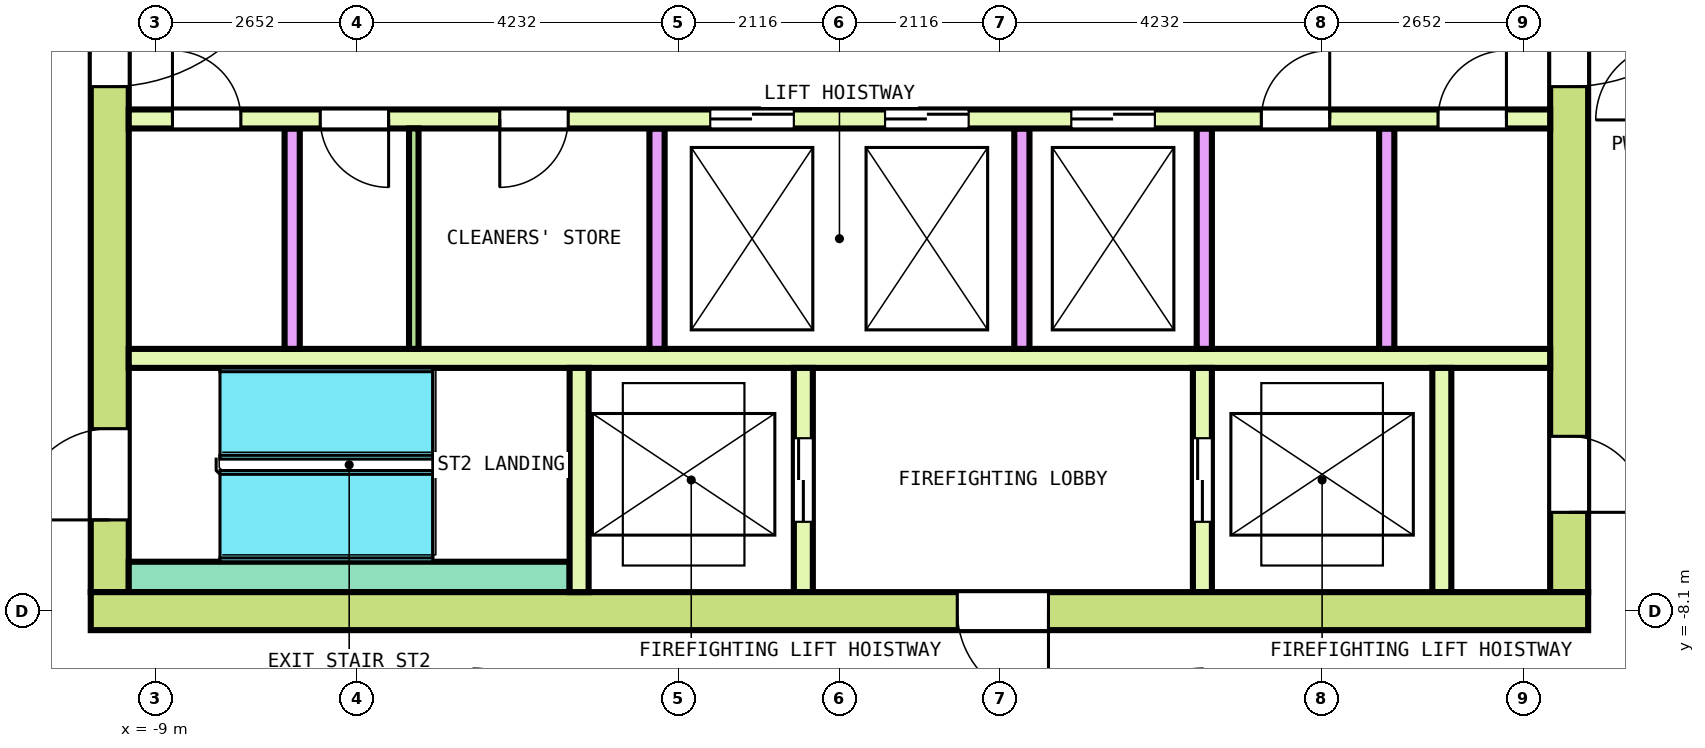
"""IFC4 building model, lengths in metres.
Left out: names, types, materials, properties, quantities, classifications, styles, units other than length and angle.
Written with IfcOpenShell. Run it as: python <this file> out.ifc"""

import sys

from ifc_helpers import new_model, si_unit, direction, frame, frame_2d, origin, place, context, subcontext, project, spatial, rectangle, extrude, element, fill, save


model = new_model("IFC4")
c1 = context("Model", 3, precision=1e-05, world=origin(), true_north=direction((0.0, 1.0)))
c2 = subcontext(c1, "Body", "Model", "MODEL_VIEW")
j1 = project(units=[si_unit("LENGTHUNIT", "METRE"), si_unit("PLANEANGLEUNIT", "RADIAN")], contexts=[c1])
p1 = place(None, origin())
s1 = spatial("IfcSite", under=j1, at=p1, CompositionType="ELEMENT")
p2 = place(p1, origin())
s2 = spatial("IfcBuilding", under=s1, at=p2, CompositionType="ELEMENT")
p3 = place(p2, frame((0.0, 0.0, 271.0)))
s3 = spatial("IfcBuildingStorey", under=s2, at=p3, CompositionType="ELEMENT", Elevation=271.0)
p4 = place(p3, frame((-9.85, -8.1, 0.0), z_axis=(0.0, 0.0, 1.0), x_axis=(1.0, 0.0, 0.0)))
e1 = element("IfcWall", 1, at=p4, inside=s3, PredefinedType="SHEAR", context=c2, shape_type="SweptSolid", body=[
    extrude(rectangle(XDim=19.7, YDim=0.5, at=frame_2d((9.85, 0.0))), origin(), (0.0, 0.0, 1.0), 3.7),
])
p5 = place(p4, frame((11.4, 0.0, 0.0)))
e2 = element("IfcOpeningElement", 2, at=p5, cuts=e1, PredefinedType="OPENING", context=c2, shape_type="SweptSolid", body=[
    extrude(rectangle(XDim=1.2, YDim=2.1, at=frame_2d((0.6, 1.05))), frame((0.0, 0.26, 0.0), z_axis=(0.0, -1.0, 0.0), x_axis=(1.0, 0.0, 0.0)), (0.0, 0.0, 1.0), 0.52),
])
p6 = place(p3, frame((-9.6, -7.85, 0.0), z_axis=(0.0, 0.0, 1.0), x_axis=(0.0, 1.0, 0.0)))
e3 = element("IfcWall", 3, at=p6, inside=s3, PredefinedType="SHEAR", context=c2, shape_type="SweptSolid", body=[
    extrude(rectangle(XDim=15.7, YDim=0.5, at=frame_2d((7.85, 0.0))), origin(), (0.0, 0.0, 1.0), 3.7),
])
p7 = place(p6, frame((6.65, 0.0, 0.0)))
e4 = element("IfcOpeningElement", 4, at=p7, cuts=e3, PredefinedType="OPENING", context=c2, shape_type="SweptSolid", body=[
    extrude(rectangle(XDim=2.4, YDim=2.1, at=frame_2d((1.2, 1.05))), frame((0.0, 0.26, 0.0), z_axis=(0.0, -1.0, 0.0), x_axis=(1.0, 0.0, 0.0)), (0.0, 0.0, 1.0), 0.52),
])
p8 = place(p6, frame((13.55, 0.0, 0.0)))
e5 = element("IfcOpeningElement", 5, at=p8, cuts=e3, PredefinedType="OPENING", context=c2, shape_type="SweptSolid", body=[
    extrude(rectangle(XDim=1.2, YDim=2.1, at=frame_2d((0.6, 1.05))), frame((0.0, 0.26, 0.0), z_axis=(0.0, -1.0, 0.0), x_axis=(1.0, 0.0, 0.0)), (0.0, 0.0, 1.0), 0.52),
])
p9 = place(p6, frame((0.95, 0.0, 0.0)))
e6 = element("IfcOpeningElement", 6, at=p9, cuts=e3, PredefinedType="OPENING", context=c2, shape_type="SweptSolid", body=[
    extrude(rectangle(XDim=1.2, YDim=2.1, at=frame_2d((0.6, 1.05))), frame((0.0, 0.26, 0.0), z_axis=(0.0, -1.0, 0.0), x_axis=(1.0, 0.0, 0.0)), (0.0, 0.0, 1.0), 0.52),
])
p10 = place(p3, frame((9.6, -7.85, 0.0), z_axis=(0.0, 0.0, 1.0), x_axis=(0.0, 1.0, 0.0)))
e7 = element("IfcWall", 7, at=p10, inside=s3, PredefinedType="SHEAR", context=c2, shape_type="SweptSolid", body=[
    extrude(rectangle(XDim=15.7, YDim=0.5, at=frame_2d((7.85, 0.0))), origin(), (0.0, 0.0, 1.0), 3.7),
])
p11 = place(p10, frame((6.65, 0.0, 0.0)))
e8 = element("IfcOpeningElement", 8, at=p11, cuts=e7, PredefinedType="OPENING", context=c2, shape_type="SweptSolid", body=[
    extrude(rectangle(XDim=2.4, YDim=2.1, at=frame_2d((1.2, 1.05))), frame((0.0, 0.26, 0.0), z_axis=(0.0, -1.0, 0.0), x_axis=(1.0, 0.0, 0.0)), (0.0, 0.0, 1.0), 0.52),
])
p12 = place(p10, frame((13.55, 0.0, 0.0)))
e9 = element("IfcOpeningElement", 9, at=p12, cuts=e7, PredefinedType="OPENING", context=c2, shape_type="SweptSolid", body=[
    extrude(rectangle(XDim=1.2, YDim=2.1, at=frame_2d((0.6, 1.05))), frame((0.0, 0.26, 0.0), z_axis=(0.0, -1.0, 0.0), x_axis=(1.0, 0.0, 0.0)), (0.0, 0.0, 1.0), 0.52),
])
p13 = place(p10, frame((1.05, 0.0, 0.0)))
e10 = element("IfcOpeningElement", 10, at=p13, cuts=e7, PredefinedType="OPENING", context=c2, shape_type="SweptSolid", body=[
    extrude(rectangle(XDim=1.0, YDim=2.1, at=frame_2d((0.5, 1.05))), frame((0.0, 0.26, 0.0), z_axis=(0.0, -1.0, 0.0), x_axis=(1.0, 0.0, 0.0)), (0.0, 0.0, 1.0), 0.52),
])
p14 = place(p3, frame((-9.35, -1.625, 0.0), z_axis=(0.0, 0.0, 1.0), x_axis=(1.0, 0.0, 0.0)))
e11 = element("IfcWall", 11, at=p14, inside=s3, PredefinedType="SOLIDWALL", context=c2, shape_type="SweptSolid", body=[
    extrude(rectangle(XDim=18.7, YDim=0.25, at=frame_2d((9.35, 0.0))), origin(), (0.0, 0.0, 1.0), 3.7),
])
p15 = place(p14, frame((7.65, 0.0, 0.0)))
e12 = element("IfcOpeningElement", 12, at=p15, cuts=e11, PredefinedType="OPENING", context=c2, shape_type="SweptSolid", body=[
    extrude(rectangle(XDim=1.1, YDim=2.1, at=frame_2d((0.55, 1.05))), frame((0.0, 0.135, 0.0), z_axis=(0.0, -1.0, 0.0), x_axis=(1.0, 0.0, 0.0)), (0.0, 0.0, 1.0), 0.27),
])
p16 = place(p14, frame((9.95, 0.0, 0.0)))
e13 = element("IfcOpeningElement", 13, at=p16, cuts=e11, PredefinedType="OPENING", context=c2, shape_type="SweptSolid", body=[
    extrude(rectangle(XDim=1.1, YDim=2.1, at=frame_2d((0.55, 1.05))), frame((0.0, 0.135, 0.0), z_axis=(0.0, -1.0, 0.0), x_axis=(1.0, 0.0, 0.0)), (0.0, 0.0, 1.0), 0.27),
])
p17 = place(p14, frame((12.4, 0.0, 0.0)))
e14 = element("IfcOpeningElement", 14, at=p17, cuts=e11, PredefinedType="OPENING", context=c2, shape_type="SweptSolid", body=[
    extrude(rectangle(XDim=1.1, YDim=2.1, at=frame_2d((0.55, 1.05))), frame((0.0, 0.135, 0.0), z_axis=(0.0, -1.0, 0.0), x_axis=(1.0, 0.0, 0.0)), (0.0, 0.0, 1.0), 0.27),
])
p18 = place(p14, frame((0.575, 0.0, 0.0)))
e15 = element("IfcOpeningElement", 15, at=p18, cuts=e11, PredefinedType="OPENING", context=c2, shape_type="SweptSolid", body=[
    extrude(rectangle(XDim=0.9, YDim=2.1, at=frame_2d((0.45, 1.05))), frame((0.0, 0.135, 0.0), z_axis=(0.0, -1.0, 0.0), x_axis=(1.0, 0.0, 0.0)), (0.0, 0.0, 1.0), 0.27),
])
p19 = place(p14, frame((2.519, 0.0, 0.0)))
e16 = element("IfcOpeningElement", 16, at=p19, cuts=e11, PredefinedType="OPENING", context=c2, shape_type="SweptSolid", body=[
    extrude(rectangle(XDim=0.9, YDim=2.1, at=frame_2d((0.45, 1.05))), frame((0.0, 0.135, 0.0), z_axis=(0.0, -1.0, 0.0), x_axis=(1.0, 0.0, 0.0)), (0.0, 0.0, 1.0), 0.27),
])
p20 = place(p14, frame((4.881, 0.0, 0.0)))
e17 = element("IfcOpeningElement", 17, at=p20, cuts=e11, PredefinedType="OPENING", context=c2, shape_type="SweptSolid", body=[
    extrude(rectangle(XDim=0.9, YDim=2.1, at=frame_2d((0.45, 1.05))), frame((0.0, 0.135, 0.0), z_axis=(0.0, -1.0, 0.0), x_axis=(1.0, 0.0, 0.0)), (0.0, 0.0, 1.0), 0.27),
])
p21 = place(p14, frame((14.9, 0.0, 0.0)))
e18 = element("IfcOpeningElement", 18, at=p21, cuts=e11, PredefinedType="OPENING", context=c2, shape_type="SweptSolid", body=[
    extrude(rectangle(XDim=0.9, YDim=2.1, at=frame_2d((0.45, 1.05))), frame((0.0, 0.135, 0.0), z_axis=(0.0, -1.0, 0.0), x_axis=(1.0, 0.0, 0.0)), (0.0, 0.0, 1.0), 0.27),
])
p22 = place(p14, frame((17.225, 0.0, 0.0)))
e19 = element("IfcOpeningElement", 19, at=p22, cuts=e11, PredefinedType="OPENING", context=c2, shape_type="SweptSolid", body=[
    extrude(rectangle(XDim=0.9, YDim=2.1, at=frame_2d((0.45, 1.05))), frame((0.0, 0.135, 0.0), z_axis=(0.0, -1.0, 0.0), x_axis=(1.0, 0.0, 0.0)), (0.0, 0.0, 1.0), 0.27),
])
p23 = place(p3, frame((-9.35, -4.775, 0.0), z_axis=(0.0, 0.0, 1.0), x_axis=(1.0, 0.0, 0.0)))
e20 = element("IfcWall", 20, at=p23, inside=s3, PredefinedType="SOLIDWALL", context=c2, shape_type="SweptSolid", body=[
    extrude(rectangle(XDim=18.7, YDim=0.25, at=frame_2d((9.35, 0.0))), origin(), (0.0, 0.0, 1.0), 3.7),
])
for number, where, z_axis, x_axis in (
    (21, (-7.2, -4.65, 0.0), (0.0, 0.0, 1.0), (0.0, 1.0, 0.0)),
    (22, (-2.4, -4.65, 0.0), (0.0, 0.0, 1.0), (0.0, 1.0, 0.0)),
    (23, (2.4, -4.65, 0.0), (0.0, 0.0, 1.0), (0.0, 1.0, 0.0)),
    (24, (4.8, -4.65, 0.0), (0.0, 0.0, 1.0), (0.0, 1.0, 0.0)),
    (25, (7.2, -4.65, 0.0), (0.0, 0.0, 1.0), (0.0, 1.0, 0.0)),
):
    element("IfcWall", number, at=place(p3, frame(where, z_axis=z_axis, x_axis=x_axis)), inside=s3, PredefinedType="SOLIDWALL", context=c2, shape_type="SweptSolid", body=[
        extrude(rectangle(XDim=2.9, YDim=0.2, at=frame_2d((1.45, 0.0))), origin(), (0.0, 0.0, 1.0), 3.7),
    ])
p24 = place(p3, frame((-9.35, -7.65, 0.0), z_axis=(0.0, 0.0, 1.0), x_axis=(1.0, 0.0, 0.0)))
e26 = element("IfcWall", 26, at=p24, inside=s3, PredefinedType="SOLIDWALL", context=c2, shape_type="SweptSolid", body=[
    extrude(rectangle(XDim=5.8, YDim=0.4, at=frame_2d((2.9, 0.0))), origin(), (0.0, 0.0, 1.0), 3.7),
])
p25 = place(p3, frame((-3.425, -7.85, 0.0), z_axis=(0.0, 0.0, 1.0), x_axis=(0.0, 1.0, 0.0)))
e27 = element("IfcWall", 27, at=p25, inside=s3, PredefinedType="SOLIDWALL", context=c2, shape_type="SweptSolid", body=[
    extrude(rectangle(XDim=2.95, YDim=0.25, at=frame_2d((1.475, 0.0))), origin(), (0.0, 0.0, 1.0), 3.7),
])
p26 = place(p3, frame((-0.475, -7.85, 0.0), z_axis=(0.0, 0.0, 1.0), x_axis=(0.0, 1.0, 0.0)))
e28 = element("IfcWall", 28, at=p26, inside=s3, PredefinedType="SOLIDWALL", context=c2, shape_type="SweptSolid", body=[
    extrude(rectangle(XDim=2.95, YDim=0.25, at=frame_2d((1.475, 0.0))), origin(), (0.0, 0.0, 1.0), 3.7),
])
p27 = place(p26, frame((0.925, 0.0, 0.0)))
e29 = element("IfcOpeningElement", 29, at=p27, cuts=e28, PredefinedType="OPENING", context=c2, shape_type="SweptSolid", body=[
    extrude(rectangle(XDim=1.1, YDim=2.1, at=frame_2d((0.55, 1.05))), frame((0.0, 0.135, 0.0), z_axis=(0.0, -1.0, 0.0), x_axis=(1.0, 0.0, 0.0)), (0.0, 0.0, 1.0), 0.27),
])
p28 = place(p3, frame((4.775, -7.85, 0.0), z_axis=(0.0, 0.0, 1.0), x_axis=(0.0, 1.0, 0.0)))
e30 = element("IfcWall", 30, at=p28, inside=s3, PredefinedType="SOLIDWALL", context=c2, shape_type="SweptSolid", body=[
    extrude(rectangle(XDim=2.95, YDim=0.25, at=frame_2d((1.475, 0.0))), origin(), (0.0, 0.0, 1.0), 3.7),
])
p29 = place(p28, frame((0.925, 0.0, 0.0)))
e31 = element("IfcOpeningElement", 31, at=p29, cuts=e30, PredefinedType="OPENING", context=c2, shape_type="SweptSolid", body=[
    extrude(rectangle(XDim=1.1, YDim=2.1, at=frame_2d((0.55, 1.05))), frame((0.0, 0.135, 0.0), z_axis=(0.0, -1.0, 0.0), x_axis=(1.0, 0.0, 0.0)), (0.0, 0.0, 1.0), 0.27),
])
p30 = place(p3, frame((7.925, -7.85, 0.0), z_axis=(0.0, 0.0, 1.0), x_axis=(0.0, 1.0, 0.0)))
e32 = element("IfcWall", 32, at=p30, inside=s3, PredefinedType="SOLIDWALL", context=c2, shape_type="SweptSolid", body=[
    extrude(rectangle(XDim=2.95, YDim=0.25, at=frame_2d((1.475, 0.0))), origin(), (0.0, 0.0, 1.0), 3.7),
])
p31 = place(p3, frame((-5.6, -4.65, 0.0), z_axis=(0.0, 0.0, 1.0), x_axis=(0.0, 1.0, 0.0)))
e33 = element("IfcWall", 33, at=p31, inside=s3, PredefinedType="PARTITIONING", context=c2, shape_type="SweptSolid", body=[
    extrude(rectangle(XDim=2.9, YDim=0.125, at=frame_2d((1.45, 0.0))), origin(), (0.0, 0.0, 1.0), 3.7),
])
p32 = place(p15, origin())
e34 = element("IfcDoor", 34, at=p32, inside=s3, OperationType="DOUBLE_DOOR_SLIDING", PredefinedType="DOOR", context=c2, shape_type="SweptSolid", body=[
    extrude(rectangle(XDim=1.1, YDim=2.1, at=frame_2d((0.55, 1.05))), frame((0.0, 0.075, 0.0), z_axis=(0.0, -1.0, 0.0), x_axis=(1.0, 0.0, 0.0)), (0.0, 0.0, 1.0), 0.15),
])
fill(e12, e34)
p33 = place(p16, origin())
e35 = element("IfcDoor", 35, at=p33, inside=s3, OperationType="DOUBLE_DOOR_SLIDING", PredefinedType="DOOR", context=c2, shape_type="SweptSolid", body=[
    extrude(rectangle(XDim=1.1, YDim=2.1, at=frame_2d((0.55, 1.05))), frame((0.0, 0.075, 0.0), z_axis=(0.0, -1.0, 0.0), x_axis=(1.0, 0.0, 0.0)), (0.0, 0.0, 1.0), 0.15),
])
fill(e13, e35)
p34 = place(p17, origin())
e36 = element("IfcDoor", 36, at=p34, inside=s3, OperationType="DOUBLE_DOOR_SLIDING", PredefinedType="DOOR", context=c2, shape_type="SweptSolid", body=[
    extrude(rectangle(XDim=1.1, YDim=2.1, at=frame_2d((0.55, 1.05))), frame((0.0, 0.075, 0.0), z_axis=(0.0, -1.0, 0.0), x_axis=(1.0, 0.0, 0.0)), (0.0, 0.0, 1.0), 0.15),
])
fill(e14, e36)
p35 = place(p27, origin())
e37 = element("IfcDoor", 37, at=p35, inside=s3, OperationType="DOUBLE_DOOR_SLIDING", PredefinedType="DOOR", context=c2, shape_type="SweptSolid", body=[
    extrude(rectangle(XDim=1.1, YDim=2.1, at=frame_2d((0.55, 1.05))), frame((0.0, 0.075, 0.0), z_axis=(0.0, -1.0, 0.0), x_axis=(1.0, 0.0, 0.0)), (0.0, 0.0, 1.0), 0.15),
])
fill(e29, e37)
p36 = place(p29, origin())
e38 = element("IfcDoor", 38, at=p36, inside=s3, OperationType="DOUBLE_DOOR_SLIDING", PredefinedType="DOOR", context=c2, shape_type="SweptSolid", body=[
    extrude(rectangle(XDim=1.1, YDim=2.1, at=frame_2d((0.55, 1.05))), frame((0.0, 0.075, 0.0), z_axis=(0.0, -1.0, 0.0), x_axis=(1.0, 0.0, 0.0)), (0.0, 0.0, 1.0), 0.15),
])
fill(e31, e38)
p37 = place(p7, origin())
e39 = element("IfcDoor", 39, at=p37, inside=s3, OperationType="DOUBLE_DOOR_SINGLE_SWING", PredefinedType="DOOR", context=c2, shape_type="SweptSolid", body=[
    extrude(rectangle(XDim=2.4, YDim=2.1, at=frame_2d((1.2, 1.05))), frame((0.0, 0.2, 0.0), z_axis=(0.0, -1.0, 0.0), x_axis=(1.0, 0.0, 0.0)), (0.0, 0.0, 1.0), 0.4),
])
fill(e4, e39)
p38 = place(p11, origin())
e40 = element("IfcDoor", 40, at=p38, inside=s3, OperationType="DOUBLE_DOOR_SINGLE_SWING", PredefinedType="DOOR", context=c2, shape_type="SweptSolid", body=[
    extrude(rectangle(XDim=2.4, YDim=2.1, at=frame_2d((1.2, 1.05))), frame((0.0, 0.2, 0.0), z_axis=(0.0, -1.0, 0.0), x_axis=(1.0, 0.0, 0.0)), (0.0, 0.0, 1.0), 0.4),
])
fill(e8, e40)
p39 = place(p9, origin())
e41 = element("IfcDoor", 41, at=p39, inside=s3, OperationType="SINGLE_SWING_LEFT", PredefinedType="DOOR", context=c2, shape_type="SweptSolid", body=[
    extrude(rectangle(XDim=1.2, YDim=2.1, at=frame_2d((0.6, 1.05))), frame((0.0, 0.2, 0.0), z_axis=(0.0, -1.0, 0.0), x_axis=(1.0, 0.0, 0.0)), (0.0, 0.0, 1.0), 0.4),
])
fill(e6, e41)
p40 = place(p5, origin())
e42 = element("IfcDoor", 42, at=p40, inside=s3, OperationType="SINGLE_SWING_LEFT", PredefinedType="DOOR", context=c2, shape_type="SweptSolid", body=[
    extrude(rectangle(XDim=1.2, YDim=2.1, at=frame_2d((0.6, 1.05))), frame((0.0, 0.2, 0.0), z_axis=(0.0, -1.0, 0.0), x_axis=(1.0, 0.0, 0.0)), (0.0, 0.0, 1.0), 0.4),
])
fill(e2, e42)
p41 = place(p13, origin())
e43 = element("IfcDoor", 43, at=p41, inside=s3, OperationType="SINGLE_SWING_LEFT", PredefinedType="DOOR", context=c2, shape_type="SweptSolid", body=[
    extrude(rectangle(XDim=1.0, YDim=2.1, at=frame_2d((0.5, 1.05))), frame((0.0, 0.2, 0.0), z_axis=(0.0, -1.0, 0.0), x_axis=(1.0, 0.0, 0.0)), (0.0, 0.0, 1.0), 0.4),
])
fill(e10, e43)
p42 = place(p18, origin())
e44 = element("IfcDoor", 44, at=p42, inside=s3, OperationType="SINGLE_SWING_LEFT", PredefinedType="DOOR", context=c2, shape_type="SweptSolid", body=[
    extrude(rectangle(XDim=0.9, YDim=2.1, at=frame_2d((0.45, 1.05))), frame((0.0, 0.075, 0.0), z_axis=(0.0, -1.0, 0.0), x_axis=(1.0, 0.0, 0.0)), (0.0, 0.0, 1.0), 0.15),
])
fill(e15, e44)
p43 = place(p19, origin())
e45 = element("IfcDoor", 45, at=p43, inside=s3, OperationType="SINGLE_SWING_RIGHT", PredefinedType="DOOR", context=c2, shape_type="SweptSolid", body=[
    extrude(rectangle(XDim=0.9, YDim=2.1, at=frame_2d((0.45, 1.05))), frame((0.0, 0.075, 0.0), z_axis=(0.0, -1.0, 0.0), x_axis=(1.0, 0.0, 0.0)), (0.0, 0.0, 1.0), 0.15),
])
fill(e16, e45)
p44 = place(p20, origin())
e46 = element("IfcDoor", 46, at=p44, inside=s3, OperationType="SINGLE_SWING_LEFT", PredefinedType="DOOR", context=c2, shape_type="SweptSolid", body=[
    extrude(rectangle(XDim=0.9, YDim=2.1, at=frame_2d((0.45, 1.05))), frame((0.0, 0.075, 0.0), z_axis=(0.0, -1.0, 0.0), x_axis=(1.0, 0.0, 0.0)), (0.0, 0.0, 1.0), 0.15),
])
fill(e17, e46)
p45 = place(p21, origin())
e47 = element("IfcDoor", 47, at=p45, inside=s3, OperationType="SINGLE_SWING_RIGHT", PredefinedType="DOOR", context=c2, shape_type="SweptSolid", body=[
    extrude(rectangle(XDim=0.9, YDim=2.1, at=frame_2d((0.45, 1.05))), frame((0.0, 0.075, 0.0), z_axis=(0.0, -1.0, 0.0), x_axis=(1.0, 0.0, 0.0)), (0.0, 0.0, 1.0), 0.15),
])
fill(e18, e47)
p46 = place(p22, origin())
e48 = element("IfcDoor", 48, at=p46, inside=s3, OperationType="SINGLE_SWING_LEFT", PredefinedType="DOOR", context=c2, shape_type="SweptSolid", body=[
    extrude(rectangle(XDim=0.9, YDim=2.1, at=frame_2d((0.45, 1.05))), frame((0.0, 0.075, 0.0), z_axis=(0.0, -1.0, 0.0), x_axis=(1.0, 0.0, 0.0)), (0.0, 0.0, 1.0), 0.15),
])
fill(e19, e48)
save(model, sys.argv[1])
